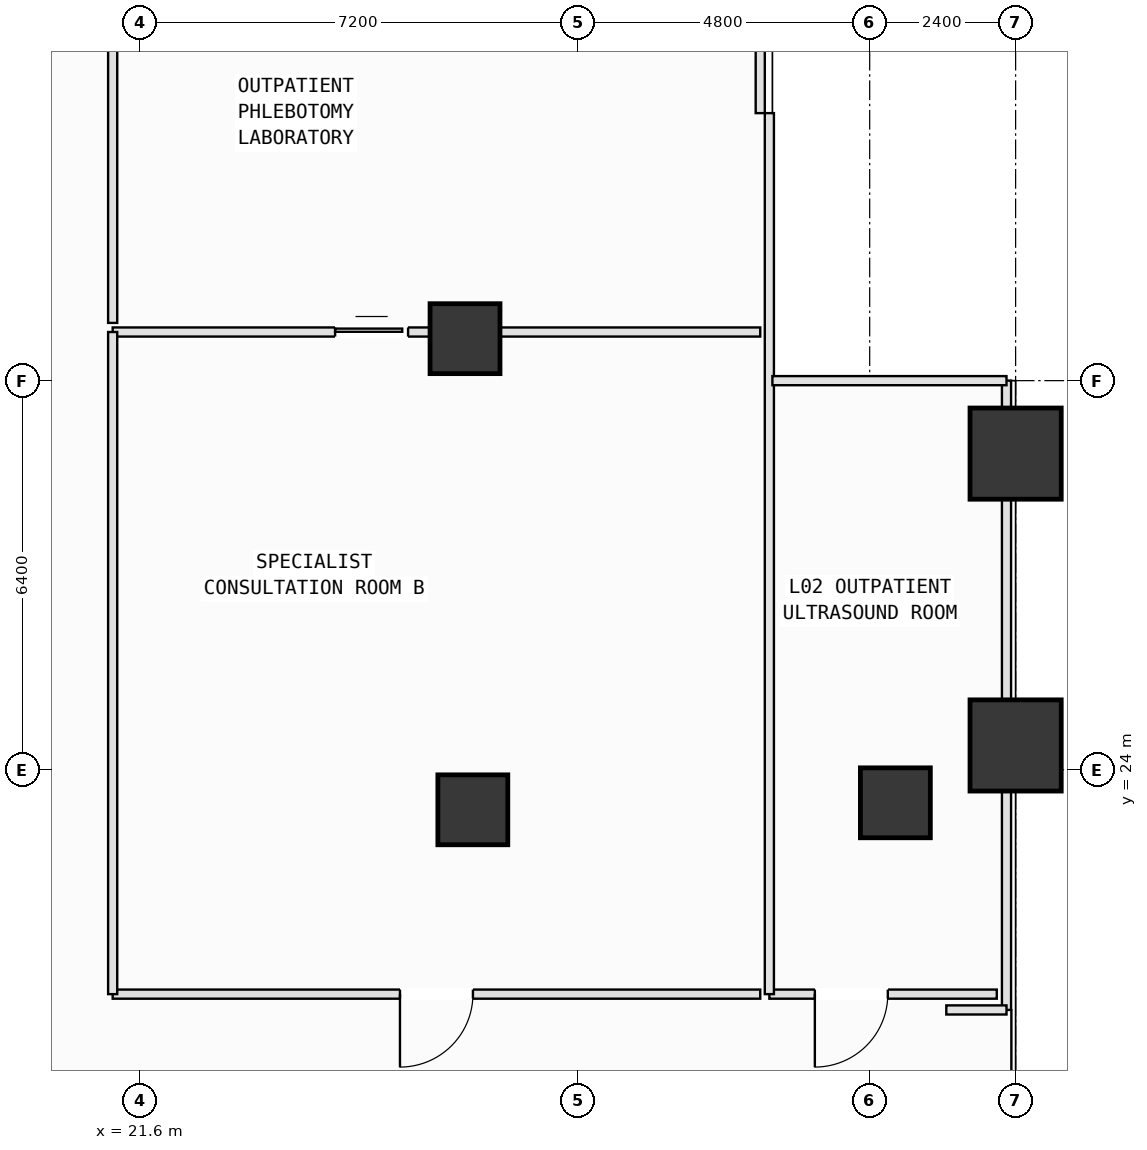
"""IFC4 building model, lengths in metres.
Left out: names, types, materials, properties, quantities, classifications, styles, units other than length and angle.
Written with IfcOpenShell. Run it as: python <this file> out.ifc"""

import sys

from ifc_helpers import new_model, si_unit, direction, frame, frame_2d, origin, origin_2d, place, context, subcontext, project, spatial, rectangle, extrude, element, fill, save


model = new_model("IFC4")
c1 = context("Model", 3, precision=1e-05, world=origin(), true_north=direction((0.0, 1.0)))
c2 = subcontext(c1, "Body", "Model", "MODEL_VIEW")
j1 = project(units=[si_unit("LENGTHUNIT", "METRE"), si_unit("PLANEANGLEUNIT", "RADIAN")], contexts=[c1])
p1 = place(None, origin())
s1 = spatial("IfcSite", under=j1, at=p1, CompositionType="ELEMENT")
p2 = place(p1, origin())
s2 = spatial("IfcBuilding", under=s1, at=p2, CompositionType="ELEMENT")
p3 = place(p2, frame((0.0, 0.0, 10.8)))
s3 = spatial("IfcBuildingStorey", under=s2, at=p3, CompositionType="ELEMENT", Elevation=10.8)
for number, where, z_axis, x_axis in (
    (1, (36.0, 24.4, 0.0), (0.0, 0.0, 1.0), (1.0, 0.0, 0.0)),
    (2, (36.0, 29.2, 0.0), (0.0, 0.0, 1.0), (1.0, 0.0, 0.0)),
):
    element("IfcColumn", number, at=place(p3, frame(where, z_axis=z_axis, x_axis=x_axis)), inside=s3, PredefinedType="PILASTER", context=c2, shape_type="SweptSolid", body=[
        extrude(rectangle(XDim=1.5, YDim=1.5, at=origin_2d()), origin(), (0.0, 0.0, 1.0), 5.4),
    ])
for number, where, z_axis, x_axis in (
    (3, (34.022, 23.457, 0.0), (0.0, 0.0, 1.0), (1.0, 0.0, 0.0)),
    (4, (27.073, 23.342, 0.0), (0.0, 0.0, 1.0), (1.0, 0.0, 0.0)),
    (5, (26.945, 31.091, 0.0), (0.0, 0.0, 1.0), (1.0, 0.0, 0.0)),
):
    element("IfcColumn", number, at=place(p3, frame(where, z_axis=z_axis, x_axis=x_axis)), inside=s3, PredefinedType="COLUMN", context=c2, shape_type="SweptSolid", body=[
        extrude(rectangle(XDim=1.15, YDim=1.15, at=origin_2d()), origin(), (0.0, 0.0, 1.0), 5.4),
    ])
p4 = place(p3, frame((35.85, 30.4, 0.0), z_axis=(0.0, 0.0, 1.0), x_axis=(0.0, -1.0, 0.0)))
e6 = element("IfcWall", 6, at=p4, inside=s3, PredefinedType="PARTITIONING", context=c2, shape_type="SweptSolid", body=[
    extrude(rectangle(XDim=10.35, YDim=0.15, at=frame_2d((5.175, 0.0))), origin(), (0.0, 0.0, 1.0), 4.235),
])
p5 = place(p3, frame((35.85, 20.05, 0.0), z_axis=(0.0, 0.0, 1.0), x_axis=(-1.0, 0.0, 0.0)))
e7 = element("IfcWall", 7, at=p5, inside=s3, PredefinedType="PARTITIONING", context=c2, shape_type="SweptSolid", body=[
    extrude(rectangle(XDim=0.99, YDim=0.15, at=frame_2d((0.495, 0.0))), origin(), (0.0, 0.0, 1.0), 5.15),
])
p6 = place(p3, frame((35.69, 20.31, 0.0), z_axis=(0.0, 0.0, 1.0), x_axis=(-1.0, 0.0, 0.0)))
e8 = element("IfcWall", 8, at=p6, inside=s3, PredefinedType="PARTITIONING", context=c2, shape_type="SweptSolid", body=[
    extrude(rectangle(XDim=3.74, YDim=0.15, at=frame_2d((1.87, 0.0))), origin(), (0.0, 0.0, 1.0), 5.15),
])
p7 = place(p6, frame((1.792, 0.0, 0.0)))
e9 = element("IfcOpeningElement", 9, at=p7, cuts=e8, PredefinedType="OPENING", context=c2, shape_type="SweptSolid", body=[
    extrude(rectangle(XDim=1.2, YDim=2.15, at=frame_2d((0.6, 1.075))), frame((0.0, 0.085, 0.0), z_axis=(0.0, -1.0, 0.0), x_axis=(1.0, 0.0, 0.0)), (0.0, 0.0, 1.0), 0.17),
])
p8 = place(p3, frame((31.95, 20.31, 0.0), z_axis=(0.0, 0.0, 1.0), x_axis=(0.0, 1.0, 0.0)))
e10 = element("IfcWall", 10, at=p8, inside=s3, PredefinedType="PARTITIONING", context=c2, shape_type="SweptSolid", body=[
    extrude(rectangle(XDim=14.49, YDim=0.15, at=frame_2d((7.245, 0.0))), origin(), (0.0, 0.0, 1.0), 5.15),
])
p9 = place(p3, frame((32.0, 30.4, 0.0), z_axis=(0.0, 0.0, 1.0), x_axis=(1.0, 0.0, 0.0)))
e11 = element("IfcWall", 11, at=p9, inside=s3, PredefinedType="PARTITIONING", context=c2, shape_type="SweptSolid", body=[
    extrude(rectangle(XDim=3.85, YDim=0.15, at=frame_2d((1.925, 0.0))), origin(), (0.0, 0.0, 1.0), 4.235),
])
p10 = place(p3, frame((21.15, 31.2, 0.0), z_axis=(0.0, 0.0, 1.0), x_axis=(1.0, 0.0, 0.0)))
e12 = element("IfcWall", 12, at=p10, inside=s3, PredefinedType="PARTITIONING", context=c2, shape_type="SweptSolid", body=[
    extrude(rectangle(XDim=10.65, YDim=0.15, at=frame_2d((5.325, 0.0))), origin(), (0.0, 0.0, 1.0), 4.235),
])
p11 = place(p10, frame((3.658, 0.0, 0.0)))
e13 = element("IfcOpeningElement", 13, at=p11, cuts=e12, PredefinedType="OPENING", context=c2, shape_type="SweptSolid", body=[
    extrude(rectangle(XDim=1.2, YDim=2.15, at=frame_2d((0.6, 1.075))), frame((0.0, 0.085, 0.0), z_axis=(0.0, -1.0, 0.0), x_axis=(1.0, 0.0, 0.0)), (0.0, 0.0, 1.0), 0.17),
])
p12 = place(p3, frame((31.8, 20.31, 0.0), z_axis=(0.0, 0.0, 1.0), x_axis=(-1.0, 0.0, 0.0)))
e14 = element("IfcWall", 14, at=p12, inside=s3, PredefinedType="PARTITIONING", context=c2, shape_type="SweptSolid", body=[
    extrude(rectangle(XDim=10.65, YDim=0.15, at=frame_2d((5.325, 0.0))), origin(), (0.0, 0.0, 1.0), 5.15),
])
p13 = place(p12, frame((4.725, 0.0, 0.0)))
e15 = element("IfcOpeningElement", 15, at=p13, cuts=e14, PredefinedType="OPENING", context=c2, shape_type="SweptSolid", body=[
    extrude(rectangle(XDim=1.2, YDim=2.15, at=frame_2d((0.6, 1.075))), frame((0.0, 0.085, 0.0), z_axis=(0.0, -1.0, 0.0), x_axis=(1.0, 0.0, 0.0)), (0.0, 0.0, 1.0), 0.17),
])
p14 = place(p3, frame((21.15, 20.31, 0.0), z_axis=(0.0, 0.0, 1.0), x_axis=(0.0, 1.0, 0.0)))
e16 = element("IfcWall", 16, at=p14, inside=s3, PredefinedType="PARTITIONING", context=c2, shape_type="SweptSolid", body=[
    extrude(rectangle(XDim=10.89, YDim=0.15, at=frame_2d((5.445, 0.0))), origin(), (0.0, 0.0, 1.0), 5.15),
])
p15 = place(p3, frame((31.8, 38.5, 0.0), z_axis=(0.0, 0.0, 1.0), x_axis=(0.0, -1.0, 0.0)))
e17 = element("IfcWall", 17, at=p15, inside=s3, PredefinedType="PARTITIONING", context=c2, shape_type="SweptSolid", body=[
    extrude(rectangle(XDim=3.7, YDim=0.15, at=frame_2d((1.85, 0.0))), origin(), (0.0, 0.0, 1.0), 5.15),
])
p16 = place(p3, frame((21.15, 31.35, 0.0), z_axis=(0.0, 0.0, 1.0), x_axis=(0.0, 1.0, 0.0)))
e18 = element("IfcWall", 18, at=p16, inside=s3, PredefinedType="PARTITIONING", context=c2, shape_type="SweptSolid", body=[
    extrude(rectangle(XDim=7.15, YDim=0.15, at=frame_2d((3.575, 0.0))), origin(), (0.0, 0.0, 1.0), 5.15),
])
p17 = place(p7, origin())
e19 = element("IfcDoor", 19, at=p17, inside=s3, OperationType="SINGLE_SWING_RIGHT", PredefinedType="DOOR", context=c2, shape_type="SweptSolid", body=[
    extrude(rectangle(XDim=1.2, YDim=2.15, at=frame_2d((0.6, 1.075))), frame((0.0, 0.025, 0.0), z_axis=(0.0, -1.0, 0.0), x_axis=(1.0, 0.0, 0.0)), (0.0, 0.0, 1.0), 0.05),
])
fill(e9, e19)
p18 = place(p13, origin())
e20 = element("IfcDoor", 20, at=p18, inside=s3, OperationType="SINGLE_SWING_RIGHT", PredefinedType="DOOR", context=c2, shape_type="SweptSolid", body=[
    extrude(rectangle(XDim=1.2, YDim=2.15, at=frame_2d((0.6, 1.075))), frame((0.0, 0.025, 0.0), z_axis=(0.0, -1.0, 0.0), x_axis=(1.0, 0.0, 0.0)), (0.0, 0.0, 1.0), 0.05),
])
fill(e15, e20)
p19 = place(p11, origin())
e21 = element("IfcDoor", 21, at=p19, inside=s3, OperationType="SLIDING_TO_LEFT", PredefinedType="DOOR", context=c2, shape_type="SweptSolid", body=[
    extrude(rectangle(XDim=1.2, YDim=2.15, at=frame_2d((0.6, 1.075))), frame((0.0, 0.025, 0.0), z_axis=(0.0, -1.0, 0.0), x_axis=(1.0, 0.0, 0.0)), (0.0, 0.0, 1.0), 0.05),
])
fill(e13, e21)
save(model, sys.argv[1])
